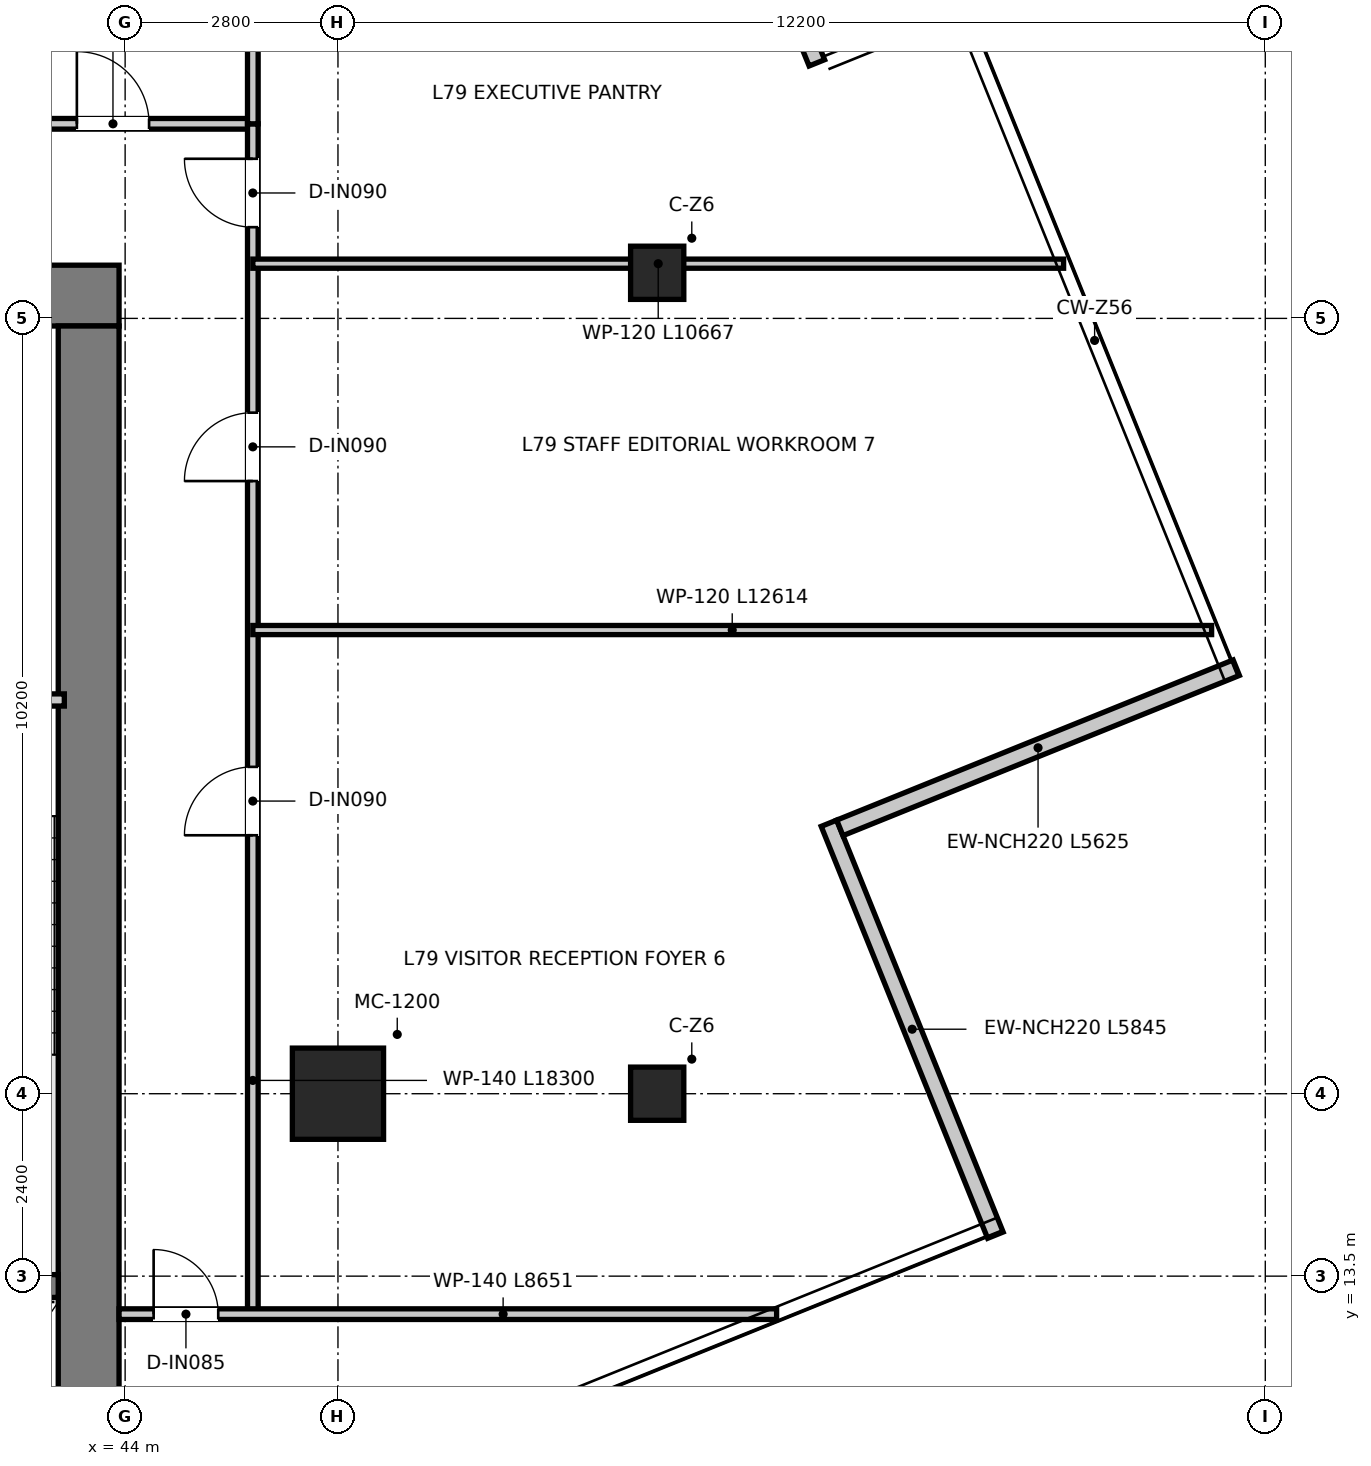
"""IFC4 building model, lengths in metres.
Left out: names, types, materials, properties, quantities, classifications, styles, units other than length and angle.
Written with IfcOpenShell. Run it as: python <this file> out.ifc"""

import sys

from ifc_helpers import new_model, si_unit, direction, frame, frame_2d, origin, origin_2d, place, context, subcontext, project, spatial, rectangle, extrude, source, transform, mapped, element, fill, save


model = new_model("IFC4")
c1 = context("Model", 3, precision=1e-05, world=origin(), true_north=direction((0.0, 1.0)))
c2 = subcontext(c1, "Body", "Model", "MODEL_VIEW")
j1 = project(units=[si_unit("LENGTHUNIT", "METRE"), si_unit("PLANEANGLEUNIT", "RADIAN")], contexts=[c1])
p1 = place(None, origin())
s1 = spatial("IfcSite", under=j1, at=p1, CompositionType="ELEMENT")
p2 = place(p1, origin())
s2 = spatial("IfcBuilding", under=s1, at=p2, CompositionType="ELEMENT")
p3 = place(p2, frame((0.0, 0.0, 323.75)))
s3 = spatial("IfcBuildingStorey", under=s2, at=p3, CompositionType="ELEMENT", Elevation=323.75)
p4 = place(p3, frame((28.08, 26.4, 0.0), z_axis=(0.0, 0.0, 1.0), x_axis=(1.0, 0.0, 0.0)))
e1 = element("IfcWall", 1, at=p4, inside=s3, PredefinedType="SHEAR", context=c2, shape_type="SweptSolid", body=[
    extrude(rectangle(XDim=15.84, YDim=0.8, at=frame_2d((7.92, 0.0))), origin(), (0.0, 0.0, 1.0), 3.95),
])
p5 = place(p4, frame((7.22, 0.0, 0.0)))
e2 = element("IfcOpeningElement", 2, at=p5, cuts=e1, PredefinedType="OPENING", context=c2, shape_type="SweptSolid", body=[
    extrude(rectangle(XDim=1.4, YDim=2.2, at=frame_2d((0.7, 1.1))), frame((0.0, 0.41, 0.0), z_axis=(0.0, -1.0, 0.0), x_axis=(1.0, 0.0, 0.0)), (0.0, 0.0, 1.0), 0.82),
])
p6 = place(p4, frame((1.775, 0.0, 0.0)))
e3 = element("IfcOpeningElement", 3, at=p6, cuts=e1, PredefinedType="OPENING", context=c2, shape_type="SweptSolid", body=[
    extrude(rectangle(XDim=1.05, YDim=2.1, at=frame_2d((0.525, 1.05))), frame((0.0, 0.41, 0.0), z_axis=(0.0, -1.0, 0.0), x_axis=(1.0, 0.0, 0.0)), (0.0, 0.0, 1.0), 0.82),
])
p7 = place(p4, frame((13.015, 0.0, 0.0)))
e4 = element("IfcOpeningElement", 4, at=p7, cuts=e1, PredefinedType="OPENING", context=c2, shape_type="SweptSolid", body=[
    extrude(rectangle(XDim=1.05, YDim=2.1, at=frame_2d((0.525, 1.05))), frame((0.0, 0.41, 0.0), z_axis=(0.0, -1.0, 0.0), x_axis=(1.0, 0.0, 0.0)), (0.0, 0.0, 1.0), 0.82),
])
p8 = place(p3, frame((43.52, 11.3, 0.0), z_axis=(0.0, 0.0, 1.0), x_axis=(0.0, 1.0, 0.0)))
e5 = element("IfcWall", 5, at=p8, inside=s3, PredefinedType="SHEAR", context=c2, shape_type="SweptSolid", body=[
    extrude(rectangle(XDim=14.7, YDim=0.8, at=frame_2d((7.35, 0.0))), origin(), (0.0, 0.0, 1.0), 3.95),
])
p9 = place(p3, frame((40.02, 13.37, 0.0), z_axis=(0.0, 0.0, 1.0), x_axis=(1.0, 0.0, 0.0)))
e6 = element("IfcWall", 6, at=p9, inside=s3, PredefinedType="SHEAR", context=c2, shape_type="SweptSolid", body=[
    extrude(rectangle(XDim=3.1, YDim=0.3, at=frame_2d((1.55, 0.0))), origin(), (0.0, 0.0, 1.0), 3.95),
])
m1 = source(origin(), c2, "Body", "SweptSolid", [
    extrude(rectangle(XDim=1.2, YDim=1.2, at=origin_2d()), origin(), (0.0, 0.0, 1.0), 3.95),
])
p10 = place(p3, frame((46.8, 15.9, 0.0), z_axis=(0.0, 0.0, 1.0), x_axis=(1.0, 0.0, 0.0)))
e7 = element("IfcColumn", 7, at=p10, inside=s3, PredefinedType="USERDEFINED", context=c2, shape_type="MappedRepresentation", body=[
    mapped(m1, transform((0.0, 0.0, 0.0), x_axis=(1.0, 0.0, 0.0), y_axis=(0.0, 1.0, 0.0), z_axis=(0.0, 0.0, 1.0), scale=1.0)),
])
m2 = source(origin(), c2, "Body", "SweptSolid", [
    extrude(rectangle(XDim=0.7, YDim=0.7, at=origin_2d()), origin(), (0.0, 0.0, 1.0), 3.95),
])
for number, where, z_axis, x_axis in (
    (8, (51.0, 26.7, 0.0), (0.0, 0.0, 1.0), (1.0, 0.0, 0.0)),
    (9, (51.0, 15.9, 0.0), (0.0, 0.0, 1.0), (1.0, 0.0, 0.0)),
):
    element("IfcColumn", number, at=place(p3, frame(where, z_axis=z_axis, x_axis=x_axis)), inside=s3, PredefinedType="COLUMN", context=c2, shape_type="MappedRepresentation", body=[
        mapped(m2, transform((0.0, 0.0, 0.0), x_axis=(1.0, 0.0, 0.0), y_axis=(0.0, 1.0, 0.0), z_axis=(0.0, 0.0, 1.0), scale=1.0)),
    ])
p11 = place(p3, frame((55.449, 14.039, 0.0), z_axis=(0.0, 0.0, 1.0), x_axis=(-0.374621884023, 0.927177676614, 0.0)))
e10 = element("IfcWall", 10, at=p11, inside=s3, PredefinedType="ELEMENTEDWALL", context=c2, shape_type="SweptSolid", body=[
    extrude(rectangle(XDim=5.845, YDim=0.22, at=frame_2d((2.922, 0.0))), origin(), (0.0, 0.0, 1.0), 3.67),
])
p12 = place(p3, frame((53.403, 19.397, 0.0), z_axis=(0.0, 0.0, 1.0), x_axis=(0.927180963658, 0.374613748588, 0.0)))
e11 = element("IfcWall", 11, at=p12, inside=s3, PredefinedType="ELEMENTEDWALL", context=c2, shape_type="SweptSolid", body=[
    extrude(rectangle(XDim=5.625, YDim=0.22, at=frame_2d((2.812, 0.0))), origin(), (0.0, 0.0, 1.0), 3.67),
])
p13 = place(p3, frame((50.22, 36.592, 0.0), z_axis=(0.0, 0.0, 1.0), x_axis=(0.374628921717, -0.927174833035, 0.0)))
e12 = element("IfcWall", 12, at=p13, inside=s3, PredefinedType="ELEMENTEDWALL", context=c2, shape_type="SweptSolid", body=[
    extrude(rectangle(XDim=7.69, YDim=0.22, at=frame_2d((3.845, 0.0))), origin(), (0.0, 0.0, 1.0), 3.38),
])
p14 = place(p13, frame((2.153, 0.0, 0.0)))
e13 = element("IfcOpeningElement", 13, at=p14, cuts=e12, PredefinedType="OPENING", context=c2, shape_type="SweptSolid", body=[
    extrude(rectangle(XDim=0.95, YDim=2.1, at=frame_2d((0.475, 1.05))), frame((0.0, 0.12, 0.0), z_axis=(0.0, -1.0, 0.0), x_axis=(1.0, 0.0, 0.0)), (0.0, 0.0, 1.0), 0.24),
])
p15 = place(p3, frame((40.04, 21.08, 0.0), z_axis=(0.0, 0.0, 1.0), x_axis=(1.0, 0.0, 0.0)))
e14 = element("IfcWall", 14, at=p15, inside=s3, PredefinedType="PARTITIONING", context=c2, shape_type="SweptSolid", body=[
    extrude(rectangle(XDim=3.16, YDim=0.16, at=frame_2d((1.58, 0.0))), origin(), (0.0, 0.0, 1.0), 3.67),
])
p16 = place(p15, frame((1.055, 0.0, 0.0)))
e15 = element("IfcOpeningElement", 15, at=p16, cuts=e14, PredefinedType="OPENING", context=c2, shape_type="SweptSolid", body=[
    extrude(rectangle(XDim=1.05, YDim=2.1, at=frame_2d((0.525, 1.05))), frame((0.0, 0.09, 0.0), z_axis=(0.0, -1.0, 0.0), x_axis=(1.0, 0.0, 0.0)), (0.0, 0.0, 1.0), 0.18),
])
p17 = place(p3, frame((26.32, 28.66, 0.0), z_axis=(0.0, 0.0, 1.0), x_axis=(1.0, 0.0, 0.0)))
e16 = element("IfcWall", 16, at=p17, inside=s3, PredefinedType="PARTITIONING", context=c2, shape_type="SweptSolid", body=[
    extrude(rectangle(XDim=19.36, YDim=0.14, at=frame_2d((9.68, 0.0))), origin(), (0.0, 0.0, 1.0), 3.18),
])
p18 = place(p17, frame((1.615, 0.0, 0.0)))
e17 = element("IfcOpeningElement", 17, at=p18, cuts=e16, PredefinedType="OPENING", context=c2, shape_type="SweptSolid", body=[
    extrude(rectangle(XDim=0.95, YDim=2.1, at=frame_2d((0.475, 1.05))), frame((0.0, 0.08, 0.0), z_axis=(0.0, -1.0, 0.0), x_axis=(1.0, 0.0, 0.0)), (0.0, 0.0, 1.0), 0.16),
])
p19 = place(p17, frame((6.705, 0.0, 0.0)))
e18 = element("IfcOpeningElement", 18, at=p19, cuts=e16, PredefinedType="OPENING", context=c2, shape_type="SweptSolid", body=[
    extrude(rectangle(XDim=0.95, YDim=2.1, at=frame_2d((0.475, 1.05))), frame((0.0, 0.08, 0.0), z_axis=(0.0, -1.0, 0.0), x_axis=(1.0, 0.0, 0.0)), (0.0, 0.0, 1.0), 0.16),
])
p20 = place(p17, frame((12.455, 0.0, 0.0)))
e19 = element("IfcOpeningElement", 19, at=p20, cuts=e16, PredefinedType="OPENING", context=c2, shape_type="SweptSolid", body=[
    extrude(rectangle(XDim=0.95, YDim=2.1, at=frame_2d((0.475, 1.05))), frame((0.0, 0.08, 0.0), z_axis=(0.0, -1.0, 0.0), x_axis=(1.0, 0.0, 0.0)), (0.0, 0.0, 1.0), 0.16),
])
p21 = place(p17, frame((17.045, 0.0, 0.0)))
e20 = element("IfcOpeningElement", 20, at=p21, cuts=e16, PredefinedType="OPENING", context=c2, shape_type="SweptSolid", body=[
    extrude(rectangle(XDim=0.95, YDim=2.1, at=frame_2d((0.475, 1.05))), frame((0.0, 0.08, 0.0), z_axis=(0.0, -1.0, 0.0), x_axis=(1.0, 0.0, 0.0)), (0.0, 0.0, 1.0), 0.16),
])
p22 = place(p3, frame((45.68, 13.0, 0.0), z_axis=(0.0, 0.0, 1.0), x_axis=(0.0, 1.0, 0.0)))
e21 = element("IfcWall", 21, at=p22, inside=s3, PredefinedType="PARTITIONING", context=c2, shape_type="SweptSolid", body=[
    extrude(rectangle(XDim=15.66, YDim=0.14, at=frame_2d((7.83, 0.0))), origin(), (0.0, 0.0, 1.0), 3.13),
])
p23 = place(p22, frame((14.3, 0.0, 0.0)))
e22 = element("IfcOpeningElement", 22, at=p23, cuts=e21, PredefinedType="OPENING", context=c2, shape_type="SweptSolid", body=[
    extrude(rectangle(XDim=0.9, YDim=2.1, at=frame_2d((0.45, 1.05))), frame((0.0, 0.08, 0.0), z_axis=(0.0, -1.0, 0.0), x_axis=(1.0, 0.0, 0.0)), (0.0, 0.0, 1.0), 0.16),
])
p24 = place(p22, frame((6.3, 0.0, 0.0)))
e23 = element("IfcOpeningElement", 23, at=p24, cuts=e21, PredefinedType="OPENING", context=c2, shape_type="SweptSolid", body=[
    extrude(rectangle(XDim=0.9, YDim=2.1, at=frame_2d((0.45, 1.05))), frame((0.0, 0.08, 0.0), z_axis=(0.0, -1.0, 0.0), x_axis=(1.0, 0.0, 0.0)), (0.0, 0.0, 1.0), 0.16),
])
p25 = place(p22, frame((10.96, 0.0, 0.0)))
e24 = element("IfcOpeningElement", 24, at=p25, cuts=e21, PredefinedType="OPENING", context=c2, shape_type="SweptSolid", body=[
    extrude(rectangle(XDim=0.9, YDim=2.1, at=frame_2d((0.45, 1.05))), frame((0.0, 0.08, 0.0), z_axis=(0.0, -1.0, 0.0), x_axis=(1.0, 0.0, 0.0)), (0.0, 0.0, 1.0), 0.16),
])
p26 = place(p3, frame((43.92, 13.0, 0.0), z_axis=(0.0, 0.0, 1.0), x_axis=(1.0, 0.0, 0.0)))
e25 = element("IfcWall", 25, at=p26, inside=s3, PredefinedType="PARTITIONING", context=c2, shape_type="SweptSolid", body=[
    extrude(rectangle(XDim=8.651, YDim=0.14, at=frame_2d((4.325, 0.0))), origin(), (0.0, 0.0, 1.0), 3.18),
])
p27 = place(p26, frame((0.455, 0.0, 0.0)))
e26 = element("IfcOpeningElement", 26, at=p27, cuts=e25, PredefinedType="OPENING", context=c2, shape_type="SweptSolid", body=[
    extrude(rectangle(XDim=0.85, YDim=2.1, at=frame_2d((0.425, 1.05))), frame((0.0, 0.08, 0.0), z_axis=(0.0, -1.0, 0.0), x_axis=(1.0, 0.0, 0.0)), (0.0, 0.0, 1.0), 0.16),
])
p28 = place(p3, frame((45.68, 26.82, 0.0), z_axis=(0.0, 0.0, 1.0), x_axis=(1.0, 0.0, 0.0)))
e27 = element("IfcWall", 27, at=p28, inside=s3, PredefinedType="PARTITIONING", context=c2, shape_type="SweptSolid", body=[
    extrude(rectangle(XDim=10.667, YDim=0.12, at=frame_2d((5.333, 0.0))), origin(), (0.0, 0.0, 1.0), 3.13),
])
p29 = place(p3, frame((45.68, 28.66, 0.0), z_axis=(0.0, 0.0, 1.0), x_axis=(0.0, 1.0, 0.0)))
e28 = element("IfcWall", 28, at=p29, inside=s3, PredefinedType="PARTITIONING", context=c2, shape_type="SweptSolid", body=[
    extrude(rectangle(XDim=2.64, YDim=0.14, at=frame_2d((1.32, 0.0))), origin(), (0.0, 0.0, 1.0), 3.43),
])
p30 = place(p3, frame((45.68, 22.0, 0.0), z_axis=(0.0, 0.0, 1.0), x_axis=(1.0, 0.0, 0.0)))
e29 = element("IfcWall", 29, at=p30, inside=s3, PredefinedType="PARTITIONING", context=c2, shape_type="SweptSolid", body=[
    extrude(rectangle(XDim=12.614, YDim=0.12, at=frame_2d((6.307, 0.0))), origin(), (0.0, 0.0, 1.0), 3.13),
])
p31 = place(p23, origin())
e30 = element("IfcDoor", 30, at=p31, inside=s3, OperationType="SINGLE_SWING_RIGHT", PredefinedType="DOOR", context=c2, shape_type="SweptSolid", body=[
    extrude(rectangle(XDim=0.9, YDim=2.1, at=frame_2d((0.45, 1.05))), frame((0.0, 0.025, 0.0), z_axis=(0.0, -1.0, 0.0), x_axis=(1.0, 0.0, 0.0)), (0.0, 0.0, 1.0), 0.05),
])
fill(e22, e30)
p32 = place(p21, origin())
e31 = element("IfcDoor", 31, at=p32, inside=s3, OperationType="SINGLE_SWING_LEFT", PredefinedType="DOOR", context=c2, shape_type="SweptSolid", body=[
    extrude(rectangle(XDim=0.95, YDim=2.1, at=frame_2d((0.475, 1.05))), frame((0.0, 0.025, 0.0), z_axis=(0.0, -1.0, 0.0), x_axis=(1.0, 0.0, 0.0)), (0.0, 0.0, 1.0), 0.05),
])
fill(e20, e31)
p33 = place(p24, origin())
e32 = element("IfcDoor", 32, at=p33, inside=s3, OperationType="SINGLE_SWING_LEFT", PredefinedType="DOOR", context=c2, shape_type="SweptSolid", body=[
    extrude(rectangle(XDim=0.9, YDim=2.1, at=frame_2d((0.45, 1.05))), frame((0.0, 0.025, 0.0), z_axis=(0.0, -1.0, 0.0), x_axis=(1.0, 0.0, 0.0)), (0.0, 0.0, 1.0), 0.05),
])
fill(e23, e32)
p34 = place(p25, origin())
e33 = element("IfcDoor", 33, at=p34, inside=s3, OperationType="SINGLE_SWING_LEFT", PredefinedType="DOOR", context=c2, shape_type="SweptSolid", body=[
    extrude(rectangle(XDim=0.9, YDim=2.1, at=frame_2d((0.45, 1.05))), frame((0.0, 0.025, 0.0), z_axis=(0.0, -1.0, 0.0), x_axis=(1.0, 0.0, 0.0)), (0.0, 0.0, 1.0), 0.05),
])
fill(e24, e33)
p35 = place(p27, origin())
e34 = element("IfcDoor", 34, at=p35, inside=s3, OperationType="SINGLE_SWING_LEFT", PredefinedType="DOOR", context=c2, shape_type="SweptSolid", body=[
    extrude(rectangle(XDim=0.85, YDim=2.1, at=frame_2d((0.425, 1.05))), frame((0.0, 0.025, 0.0), z_axis=(0.0, -1.0, 0.0), x_axis=(1.0, 0.0, 0.0)), (0.0, 0.0, 1.0), 0.05),
])
fill(e26, e34)
save(model, sys.argv[1])
